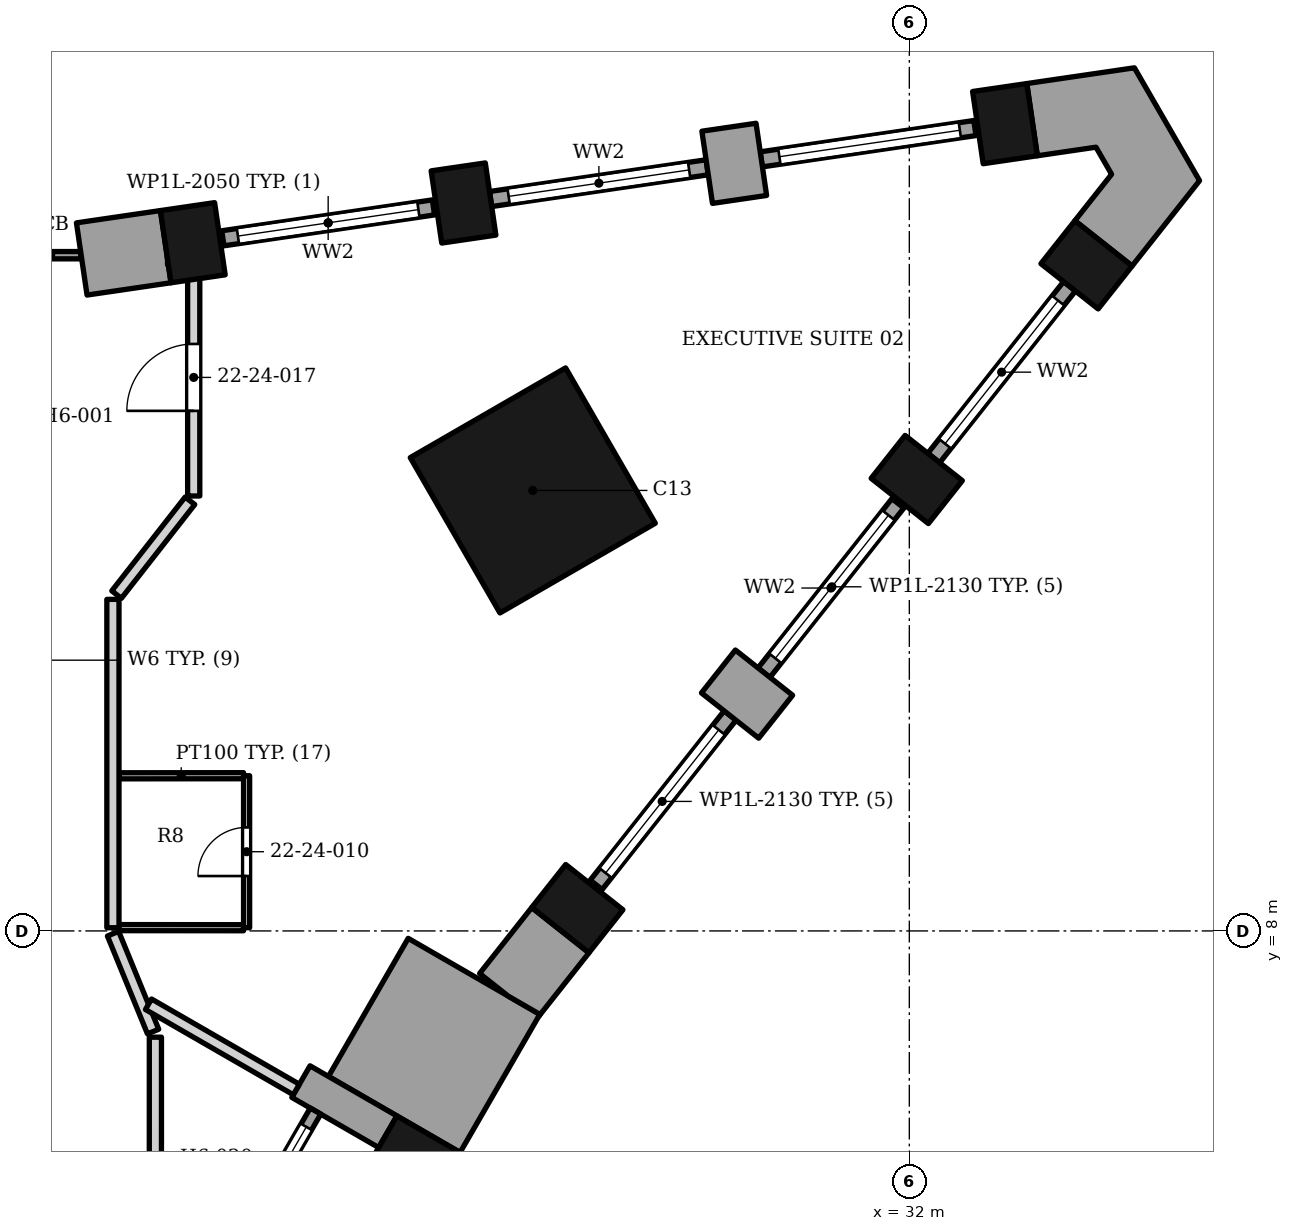
"""IFC4 building model, lengths in metres.
Left out: names, types, materials, properties, quantities, classifications, styles, units other than length and angle.
Written with IfcOpenShell. Run it as: python <this file> out.ifc"""

import sys

from ifc_helpers import new_model, si_unit, direction, frame, frame_2d, origin, origin_2d, place, context, subcontext, project, spatial, polyline, rectangle, outline, extrude, element, fill, save


model = new_model("IFC4")
c1 = context("Model", 3, precision=1e-05, world=origin(), true_north=direction((0.0, 1.0)))
c2 = subcontext(c1, "Body", "Model", "MODEL_VIEW")
j1 = project(units=[si_unit("LENGTHUNIT", "METRE"), si_unit("PLANEANGLEUNIT", "RADIAN")], contexts=[c1])
p1 = place(None, origin())
s1 = spatial("IfcSite", under=j1, at=p1, CompositionType="ELEMENT")
p2 = place(p1, origin())
s2 = spatial("IfcBuilding", under=s1, at=p2, CompositionType="ELEMENT")
p3 = place(p2, frame((0.0, 0.0, 102.0)))
s3 = spatial("IfcBuildingStorey", under=s2, at=p3, CompositionType="ELEMENT", Elevation=102.0)
p4 = place(p3, frame((25.807, 15.244, 0.0), z_axis=(0.0, 0.0, 1.0), x_axis=(-0.866025403784, -0.5, 0.0)))
e1 = element("IfcColumn", 1, at=p4, inside=s3, PredefinedType="COLUMN", context=c2, shape_type="SweptSolid", body=[
    extrude(rectangle(XDim=2.95, YDim=2.95, at=origin_2d()), origin(), (0.0, 0.0, 1.0), 3.4),
])
for number, where, z_axis, x_axis in (
    (2, (23.867, 4.267, 0.0), (0.0, 0.0, 1.0), (0.5, 0.866, 0.0)),
    (3, (26.54, 8.367, 0.0), (0.0, 0.0, 1.0), (0.62, 0.784, 0.0)),
    (4, (32.122, 15.424, 0.0), (0.0, 0.0, 1.0), (0.62, 0.784, 0.0)),
    (5, (34.914, 18.954, 0.0), (0.0, 0.0, 1.0), (0.62, 0.784, 0.0)),
    (6, (33.573, 21.276, 0.0), (0.0, 0.0, 1.0), (-0.989, -0.145, 0.0)),
    (7, (24.668, 19.971, 0.0), (0.0, 0.0, 1.0), (-0.989, -0.145, 0.0)),
    (8, (20.216, 19.318, 0.0), (0.0, 0.0, 1.0), (-0.989, -0.145, 0.0)),
):
    element("IfcColumn", number, at=place(p3, frame(where, z_axis=z_axis, x_axis=x_axis)), inside=s3, PredefinedType="COLUMN", context=c2, shape_type="SweptSolid", body=[
        extrude(rectangle(XDim=0.9, YDim=1.2, at=origin_2d()), origin(), (0.0, 0.0, 1.0), 3.4),
    ])
p5 = place(p3, frame((23.423, 4.697, 0.0), z_axis=(0.0, 0.0, 1.0), x_axis=(-0.865976140824, 0.500085316245, 0.0)))
e9 = element("IfcWall", 9, at=p5, inside=s3, PredefinedType="SOLIDWALL", context=c2, shape_type="SweptSolid", body=[
    extrude(rectangle(XDim=1.65, YDim=0.6, at=frame_2d((0.825, 0.0))), origin(), (0.0, 0.0, 1.0), 2.45),
])
p6 = place(p3, frame((20.133, 1.4, 0.0), z_axis=(0.0, 0.0, 1.0), x_axis=(0.500002543286, 0.866023935413, 0.0)))
e10 = element("IfcWall", 10, at=p6, inside=s3, PredefinedType="ELEMENTEDWALL", context=c2, shape_type="SweptSolid", body=[
    extrude(rectangle(XDim=4.2, YDim=0.2, at=frame_2d((2.1, 0.0))), origin(), (0.0, 0.0, 1.0), 2.45),
])
p7 = place(p6, frame((0.3, 0.0, 0.6)))
e11 = element("IfcOpeningElement", 11, at=p7, cuts=e10, PredefinedType="OPENING", context=c2, shape_type="SweptSolid", body=[
    extrude(rectangle(XDim=2.1, YDim=1.75, at=frame_2d((1.05, 0.875))), frame((0.0, 0.11, 0.0), z_axis=(0.0, -1.0, 0.0), x_axis=(1.0, 0.0, 0.0)), (0.0, 0.0, 1.0), 0.22),
])
p8 = place(p6, frame((2.7, 0.0, 0.0)))
e12 = element("IfcOpeningElement", 12, at=p8, cuts=e10, PredefinedType="OPENING", context=c2, shape_type="SweptSolid", body=[
    extrude(rectangle(XDim=1.2, YDim=2.35, at=frame_2d((0.6, 1.175))), frame((0.0, 0.11, 0.0), z_axis=(0.0, -1.0, 0.0), x_axis=(1.0, 0.0, 0.0)), (0.0, 0.0, 1.0), 0.22),
])
p9 = place(p3, origin())
e13 = element("IfcWall", 13, at=p9, inside=s3, PredefinedType="SOLIDWALL", context=c2, shape_type="SweptSolid", body=[
    extrude(outline(polyline([(23.758, 7.878), (22.447, 5.607), (24.612, 4.357), (25.923, 6.628), (23.758, 7.878)])), origin(), (0.0, 0.0, 1.0), 2.552),
])
p10 = place(p3, frame((29.802, 11.522, 0.0), z_axis=(0.0, 0.0, 1.0), x_axis=(-0.784330409431, 0.620343299184, 0.0)))
e14 = element("IfcWall", 14, at=p10, inside=s3, PredefinedType="SOLIDWALL", context=c2, shape_type="SweptSolid", body=[
    extrude(rectangle(XDim=1.2, YDim=0.9, at=frame_2d((0.6, 0.0))), origin(), (0.0, 0.0, 1.0), 2.63),
])
p11 = place(p3, frame((26.85, 8.757, 0.0), z_axis=(0.0, 0.0, 1.0), x_axis=(0.620259189042, 0.784396926568, 0.0)))
e15 = element("IfcWall", 15, at=p11, inside=s3, PredefinedType="ELEMENTEDWALL", context=c2, shape_type="SweptSolid", body=[
    extrude(rectangle(XDim=3.552, YDim=0.25, at=frame_2d((1.776, 0.0))), origin(), (0.0, 0.0, 1.0), 2.63),
])
p12 = place(p11, frame((0.25, 0.0, 0.3)))
e16 = element("IfcOpeningElement", 16, at=p12, cuts=e15, PredefinedType="OPENING", context=c2, shape_type="SweptSolid", body=[
    extrude(rectangle(XDim=3.0, YDim=2.13, at=frame_2d((1.5, 1.065))), frame((0.0, 0.135, 0.0), z_axis=(0.0, -1.0, 0.0), x_axis=(1.0, 0.0, 0.0)), (0.0, 0.0, 1.0), 0.27),
])
p13 = place(p3, frame((29.609, 12.246, 0.0), z_axis=(0.0, 0.0, 1.0), x_axis=(0.620334919108, 0.784337037335, 0.0)))
e17 = element("IfcWall", 17, at=p13, inside=s3, PredefinedType="ELEMENTEDWALL", context=c2, shape_type="SweptSolid", body=[
    extrude(rectangle(XDim=3.552, YDim=0.25, at=frame_2d((1.776, 0.0))), origin(), (0.0, 0.0, 1.0), 2.63),
])
p14 = place(p13, frame((0.302, 0.0, 0.3)))
e18 = element("IfcOpeningElement", 18, at=p14, cuts=e17, PredefinedType="OPENING", context=c2, shape_type="SweptSolid", body=[
    extrude(rectangle(XDim=3.0, YDim=2.13, at=frame_2d((1.5, 1.065))), frame((0.0, 0.135, 0.0), z_axis=(0.0, -1.0, 0.0), x_axis=(1.0, 0.0, 0.0)), (0.0, 0.0, 1.0), 0.27),
])
p15 = place(p3, frame((32.401, 15.777, 0.0), z_axis=(0.0, 0.0, 1.0), x_axis=(0.620343299184, 0.784330409431, 0.0)))
e19 = element("IfcWall", 19, at=p15, inside=s3, PredefinedType="ELEMENTEDWALL", context=c2, shape_type="SweptSolid", body=[
    extrude(rectangle(XDim=3.6, YDim=0.25, at=frame_2d((1.8, 0.0))), origin(), (0.0, 0.0, 1.0), 2.63),
])
p16 = place(p15, frame((0.3, 0.0, 0.3)))
e20 = element("IfcOpeningElement", 20, at=p16, cuts=e19, PredefinedType="OPENING", context=c2, shape_type="SweptSolid", body=[
    extrude(rectangle(XDim=3.0, YDim=2.13, at=frame_2d((1.5, 1.065))), frame((0.0, 0.135, 0.0), z_axis=(0.0, -1.0, 0.0), x_axis=(1.0, 0.0, 0.0)), (0.0, 0.0, 1.0), 0.27),
])
p17 = place(p3, frame((29.034, 21.217, 0.0), z_axis=(0.0, 0.0, 1.0), x_axis=(0.145066385332, -0.989421924078, 0.0)))
e21 = element("IfcWall", 21, at=p17, inside=s3, PredefinedType="SOLIDWALL", context=c2, shape_type="SweptSolid", body=[
    extrude(rectangle(XDim=1.2, YDim=0.9, at=frame_2d((0.6, 0.0))), origin(), (0.0, 0.0, 1.0), 2.63),
])
p18 = place(p3, frame((33.078, 21.203, 0.0), z_axis=(0.0, 0.0, 1.0), x_axis=(-0.989427410985, -0.145028957081, 0.0)))
e22 = element("IfcWall", 22, at=p18, inside=s3, PredefinedType="ELEMENTEDWALL", context=c2, shape_type="SweptSolid", body=[
    extrude(rectangle(XDim=3.552, YDim=0.25, at=frame_2d((1.776, 0.0))), origin(), (0.0, 0.0, 1.0), 2.63),
])
p19 = place(p18, frame((0.25, 0.0, 0.3)))
e23 = element("IfcOpeningElement", 23, at=p19, cuts=e22, PredefinedType="OPENING", context=c2, shape_type="SweptSolid", body=[
    extrude(rectangle(XDim=3.0, YDim=2.13, at=frame_2d((1.5, 1.065))), frame((0.0, 0.135, 0.0), z_axis=(0.0, -1.0, 0.0), x_axis=(1.0, 0.0, 0.0)), (0.0, 0.0, 1.0), 0.27),
])
p20 = place(p3, frame((28.675, 20.558, 0.0), z_axis=(0.0, 0.0, 1.0), x_axis=(-0.989431656237, -0.144999991846, 0.0)))
e24 = element("IfcWall", 24, at=p20, inside=s3, PredefinedType="ELEMENTEDWALL", context=c2, shape_type="SweptSolid", body=[
    extrude(rectangle(XDim=3.6, YDim=0.25, at=frame_2d((1.8, 0.0))), origin(), (0.0, 0.0, 1.0), 2.63),
])
p21 = place(p20, frame((0.3, 0.0, 0.3)))
e25 = element("IfcOpeningElement", 25, at=p21, cuts=e24, PredefinedType="OPENING", context=c2, shape_type="SweptSolid", body=[
    extrude(rectangle(XDim=3.0, YDim=2.13, at=frame_2d((1.5, 1.065))), frame((0.0, 0.135, 0.0), z_axis=(0.0, -1.0, 0.0), x_axis=(1.0, 0.0, 0.0)), (0.0, 0.0, 1.0), 0.27),
])
p22 = place(p3, frame((24.174, 19.898, 0.0), z_axis=(0.0, 0.0, 1.0), x_axis=(-0.989429597643, -0.145014038315, 0.0)))
e26 = element("IfcWall", 26, at=p22, inside=s3, PredefinedType="ELEMENTEDWALL", context=c2, shape_type="SweptSolid", body=[
    extrude(rectangle(XDim=3.5, YDim=0.25, at=frame_2d((1.75, 0.0))), origin(), (0.0, 0.0, 1.0), 2.552),
])
p23 = place(p22, frame((0.25, 0.0, 0.3)))
e27 = element("IfcOpeningElement", 27, at=p23, cuts=e26, PredefinedType="OPENING", context=c2, shape_type="SweptSolid", body=[
    extrude(rectangle(XDim=3.0, YDim=2.05, at=frame_2d((1.5, 1.025))), frame((0.0, 0.135, 0.0), z_axis=(0.0, -1.0, 0.0), x_axis=(1.0, 0.0, 0.0)), (0.0, 0.0, 1.0), 0.27),
])
p24 = place(p3, origin())
e28 = element("IfcWall", 28, at=p24, inside=s3, PredefinedType="SOLIDWALL", context=c2, shape_type="SweptSolid", body=[
    extrude(outline(polyline([(25.79, 8.384), (24.933, 7.3), (25.403, 6.928), (25.923, 6.628), (25.901, 6.59), (26.731, 7.64), (25.79, 8.384)])), origin(), (0.0, 0.0, 1.0), 2.63),
])
p25 = place(p3, origin())
e29 = element("IfcWall", 29, at=p25, inside=s3, PredefinedType="SOLIDWALL", context=c2, shape_type="SweptSolid", body=[
    extrude(outline(polyline([(35.327, 20.443), (34.722, 19.679), (35.664, 18.935), (36.773, 20.338), (35.701, 22.194), (33.931, 21.935), (34.105, 20.748), (35.07, 20.889), (35.327, 20.443)])), origin(), (0.0, 0.0, 1.0), 2.65),
])
p26 = place(p3, frame((18.389, 19.051, 0.0), z_axis=(0.0, 0.0, 1.0), x_axis=(0.989435994601, 0.144970385211, 0.0)))
e30 = element("IfcWall", 30, at=p26, inside=s3, PredefinedType="SOLIDWALL", context=c2, shape_type="SweptSolid", body=[
    extrude(rectangle(XDim=1.396, YDim=1.2, at=frame_2d((0.698, 0.0))), origin(), (0.0, 0.0, 1.0), 2.65),
])
p27 = place(p3, frame((17.383, 19.113, 0.0), z_axis=(0.0, 0.0, 1.0), x_axis=(1.0, 0.0, 0.0)))
e31 = element("IfcWall", 31, at=p27, inside=s3, PredefinedType="SOLIDWALL", context=c2, shape_type="SweptSolid", body=[
    extrude(rectangle(XDim=0.99, YDim=0.12, at=frame_2d((0.495, 0.0))), origin(), (0.0, 0.0, 1.0), 2.65),
])
p28 = place(p3, frame((19.6, 3.9, 0.0), z_axis=(0.0, 0.0, 1.0), x_axis=(0.000207511927, 0.999999978469, 0.0)))
e32 = element("IfcWall", 32, at=p28, inside=s3, PredefinedType="PARTITIONING", context=c2, shape_type="SweptSolid", body=[
    extrude(rectangle(XDim=2.353, YDim=0.2, at=frame_2d((1.177, 0.0))), origin(), (0.0, 0.0, 1.0), 2.45),
])
p29 = place(p3, frame((18.904, 7.954, 0.0), z_axis=(0.0, 0.0, 1.0), x_axis=(0.378643783121, -0.925542481739, 0.0)))
e33 = element("IfcWall", 33, at=p29, inside=s3, PredefinedType="PARTITIONING", context=c2, shape_type="SweptSolid", body=[
    extrude(rectangle(XDim=1.738, YDim=0.2, at=frame_2d((0.869, 0.0))), origin(), (0.0, 0.0, 1.0), 3.23),
])
p30 = place(p3, frame((19.487, 6.794, 0.0), z_axis=(0.0, 0.0, 1.0), x_axis=(0.866320237392, -0.499488985149, 0.0)))
e34 = element("IfcWall", 34, at=p30, inside=s3, PredefinedType="PARTITIONING", context=c2, shape_type="SweptSolid", body=[
    extrude(rectangle(XDim=2.807, YDim=0.2, at=frame_2d((1.403, 0.0))), origin(), (0.0, 0.0, 1.0), 3.23),
])
p31 = place(p3, frame((19.0, 8.054, 0.0), z_axis=(0.0, 0.0, 1.0), x_axis=(0.999999744716, -0.000714540725, 0.0)))
e35 = element("IfcWall", 35, at=p31, inside=s3, PredefinedType="PARTITIONING", context=c2, shape_type="SweptSolid", body=[
    extrude(rectangle(XDim=2.05, YDim=0.1, at=frame_2d((1.025, 0.0))), origin(), (0.0, 0.0, 1.0), 3.23),
])
p32 = place(p3, frame((21.101, 8.053, 0.0), z_axis=(0.0, 0.0, 1.0), x_axis=(0.0, 1.0, 0.0)))
e36 = element("IfcWall", 36, at=p32, inside=s3, PredefinedType="PARTITIONING", context=c2, shape_type="SweptSolid", body=[
    extrude(rectangle(XDim=2.5, YDim=0.1, at=frame_2d((1.25, 0.0))), origin(), (0.0, 0.0, 1.0), 3.23),
])
p33 = place(p32, frame((0.85, 0.0, 0.0)))
e37 = element("IfcOpeningElement", 37, at=p33, cuts=e36, PredefinedType="OPENING", context=c2, shape_type="SweptSolid", body=[
    extrude(rectangle(XDim=0.8, YDim=2.1, at=frame_2d((0.4, 1.05))), frame((0.0, 0.06, 0.0), z_axis=(0.0, -1.0, 0.0), x_axis=(1.0, 0.0, 0.0)), (0.0, 0.0, 1.0), 0.12),
])
p34 = place(p3, frame((19.0, 10.551, 0.0), z_axis=(0.0, 0.0, 1.0), x_axis=(0.999999744716, 0.000714540725, 0.0)))
e38 = element("IfcWall", 38, at=p34, inside=s3, PredefinedType="PARTITIONING", context=c2, shape_type="SweptSolid", body=[
    extrude(rectangle(XDim=2.05, YDim=0.1, at=frame_2d((1.025, 0.0))), origin(), (0.0, 0.0, 1.0), 3.23),
])
p35 = place(p3, frame((18.902, 8.053, 0.0), z_axis=(0.0, 0.0, 1.0), x_axis=(0.0, 1.0, 0.0)))
e39 = element("IfcWall", 39, at=p35, inside=s3, PredefinedType="PARTITIONING", context=c2, shape_type="SweptSolid", body=[
    extrude(rectangle(XDim=5.4, YDim=0.2, at=frame_2d((2.7, 0.0))), origin(), (0.0, 0.0, 1.0), 3.23),
])
p36 = place(p3, frame((18.962, 13.531, 0.0), z_axis=(0.0, 0.0, 1.0), x_axis=(0.61620743618, 0.787583897497, 0.0)))
e40 = element("IfcWall", 40, at=p36, inside=s3, PredefinedType="PARTITIONING", context=c2, shape_type="SweptSolid", body=[
    extrude(rectangle(XDim=1.959, YDim=0.2, at=frame_2d((0.979, 0.0))), origin(), (0.0, 0.0, 1.0), 3.23),
])
p37 = place(p3, frame((20.231, 19.053, 0.0), z_axis=(0.0, 0.0, 1.0), x_axis=(0.0, -1.0, 0.0)))
e41 = element("IfcWall", 41, at=p37, inside=s3, PredefinedType="PARTITIONING", context=c2, shape_type="SweptSolid", body=[
    extrude(rectangle(XDim=3.9, YDim=0.2, at=frame_2d((1.95, 0.0))), origin(), (0.0, 0.0, 1.0), 3.23),
])
p38 = place(p37, frame((1.4, 0.0, 0.0)))
e42 = element("IfcOpeningElement", 42, at=p38, cuts=e41, PredefinedType="OPENING", context=c2, shape_type="SweptSolid", body=[
    extrude(rectangle(XDim=1.1, YDim=2.1, at=frame_2d((0.55, 1.05))), frame((0.0, 0.11, 0.0), z_axis=(0.0, -1.0, 0.0), x_axis=(1.0, 0.0, 0.0)), (0.0, 0.0, 1.0), 0.22),
])
p39 = place(p3, frame((19.8, 19.053, 0.0), z_axis=(0.0, 0.0, 1.0), x_axis=(1.0, 0.0, 0.0)))
e43 = element("IfcWall", 43, at=p39, inside=s3, PredefinedType="PARTITIONING", context=c2, shape_type="SweptSolid", body=[
    extrude(rectangle(XDim=0.331, YDim=0.2, at=frame_2d((0.166, 0.0))), origin(), (0.0, 0.0, 1.0), 3.23),
])
p40 = place(p8, origin())
e44 = element("IfcDoor", 44, at=p40, inside=s3, OperationType="SINGLE_SWING_LEFT", PredefinedType="DOOR", context=c2, shape_type="SweptSolid", body=[
    extrude(rectangle(XDim=1.2, YDim=2.35, at=frame_2d((0.6, 1.175))), frame((0.0, 0.025, 0.0), z_axis=(0.0, -1.0, 0.0), x_axis=(1.0, 0.0, 0.0)), (0.0, 0.0, 1.0), 0.05),
])
fill(e12, e44)
p41 = place(p12, origin())
e45 = element("IfcWindow", 45, at=p41, inside=s3, PartitioningType="SINGLE_PANEL", PredefinedType="WINDOW", context=c2, shape_type="SweptSolid", body=[
    extrude(rectangle(XDim=3.0, YDim=2.13, at=frame_2d((1.5, 1.065))), frame((0.0, 0.03, 0.0), z_axis=(0.0, -1.0, 0.0), x_axis=(1.0, 0.0, 0.0)), (0.0, 0.0, 1.0), 0.06),
])
fill(e16, e45)
p42 = place(p14, origin())
e46 = element("IfcWindow", 46, at=p42, inside=s3, PartitioningType="SINGLE_PANEL", PredefinedType="WINDOW", context=c2, shape_type="SweptSolid", body=[
    extrude(rectangle(XDim=3.0, YDim=2.13, at=frame_2d((1.5, 1.065))), frame((0.0, 0.03, 0.0), z_axis=(0.0, -1.0, 0.0), x_axis=(1.0, 0.0, 0.0)), (0.0, 0.0, 1.0), 0.06),
])
fill(e18, e46)
p43 = place(p16, origin())
e47 = element("IfcWindow", 47, at=p43, inside=s3, PartitioningType="SINGLE_PANEL", PredefinedType="WINDOW", context=c2, shape_type="SweptSolid", body=[
    extrude(rectangle(XDim=3.0, YDim=2.13, at=frame_2d((1.5, 1.065))), frame((0.0, 0.03, 0.0), z_axis=(0.0, -1.0, 0.0), x_axis=(1.0, 0.0, 0.0)), (0.0, 0.0, 1.0), 0.06),
])
fill(e20, e47)
p44 = place(p19, origin())
e48 = element("IfcWindow", 48, at=p44, inside=s3, PartitioningType="SINGLE_PANEL", PredefinedType="WINDOW", context=c2, shape_type="SweptSolid", body=[
    extrude(rectangle(XDim=3.0, YDim=2.13, at=frame_2d((1.5, 1.065))), frame((0.0, 0.03, 0.0), z_axis=(0.0, -1.0, 0.0), x_axis=(1.0, 0.0, 0.0)), (0.0, 0.0, 1.0), 0.06),
])
fill(e23, e48)
p45 = place(p21, origin())
e49 = element("IfcWindow", 49, at=p45, inside=s3, PartitioningType="SINGLE_PANEL", PredefinedType="WINDOW", context=c2, shape_type="SweptSolid", body=[
    extrude(rectangle(XDim=3.0, YDim=2.13, at=frame_2d((1.5, 1.065))), frame((0.0, 0.03, 0.0), z_axis=(0.0, -1.0, 0.0), x_axis=(1.0, 0.0, 0.0)), (0.0, 0.0, 1.0), 0.06),
])
fill(e25, e49)
p46 = place(p23, origin())
e50 = element("IfcWindow", 50, at=p46, inside=s3, PartitioningType="SINGLE_PANEL", PredefinedType="WINDOW", context=c2, shape_type="SweptSolid", body=[
    extrude(rectangle(XDim=3.0, YDim=2.05, at=frame_2d((1.5, 1.025))), frame((0.0, 0.03, 0.0), z_axis=(0.0, -1.0, 0.0), x_axis=(1.0, 0.0, 0.0)), (0.0, 0.0, 1.0), 0.06),
])
fill(e27, e50)
p47 = place(p33, origin())
e51 = element("IfcDoor", 51, at=p47, inside=s3, OperationType="SINGLE_SWING_LEFT", PredefinedType="DOOR", context=c2, shape_type="SweptSolid", body=[
    extrude(rectangle(XDim=0.8, YDim=2.1, at=frame_2d((0.4, 1.05))), frame((0.0, 0.025, 0.0), z_axis=(0.0, -1.0, 0.0), x_axis=(1.0, 0.0, 0.0)), (0.0, 0.0, 1.0), 0.05),
])
fill(e37, e51)
p48 = place(p38, origin())
e52 = element("IfcDoor", 52, at=p48, inside=s3, OperationType="SINGLE_SWING_RIGHT", PredefinedType="DOOR", context=c2, shape_type="SweptSolid", body=[
    extrude(rectangle(XDim=1.1, YDim=2.1, at=frame_2d((0.55, 1.05))), frame((0.0, 0.025, 0.0), z_axis=(0.0, -1.0, 0.0), x_axis=(1.0, 0.0, 0.0)), (0.0, 0.0, 1.0), 0.05),
])
fill(e42, e52)
save(model, sys.argv[1])
